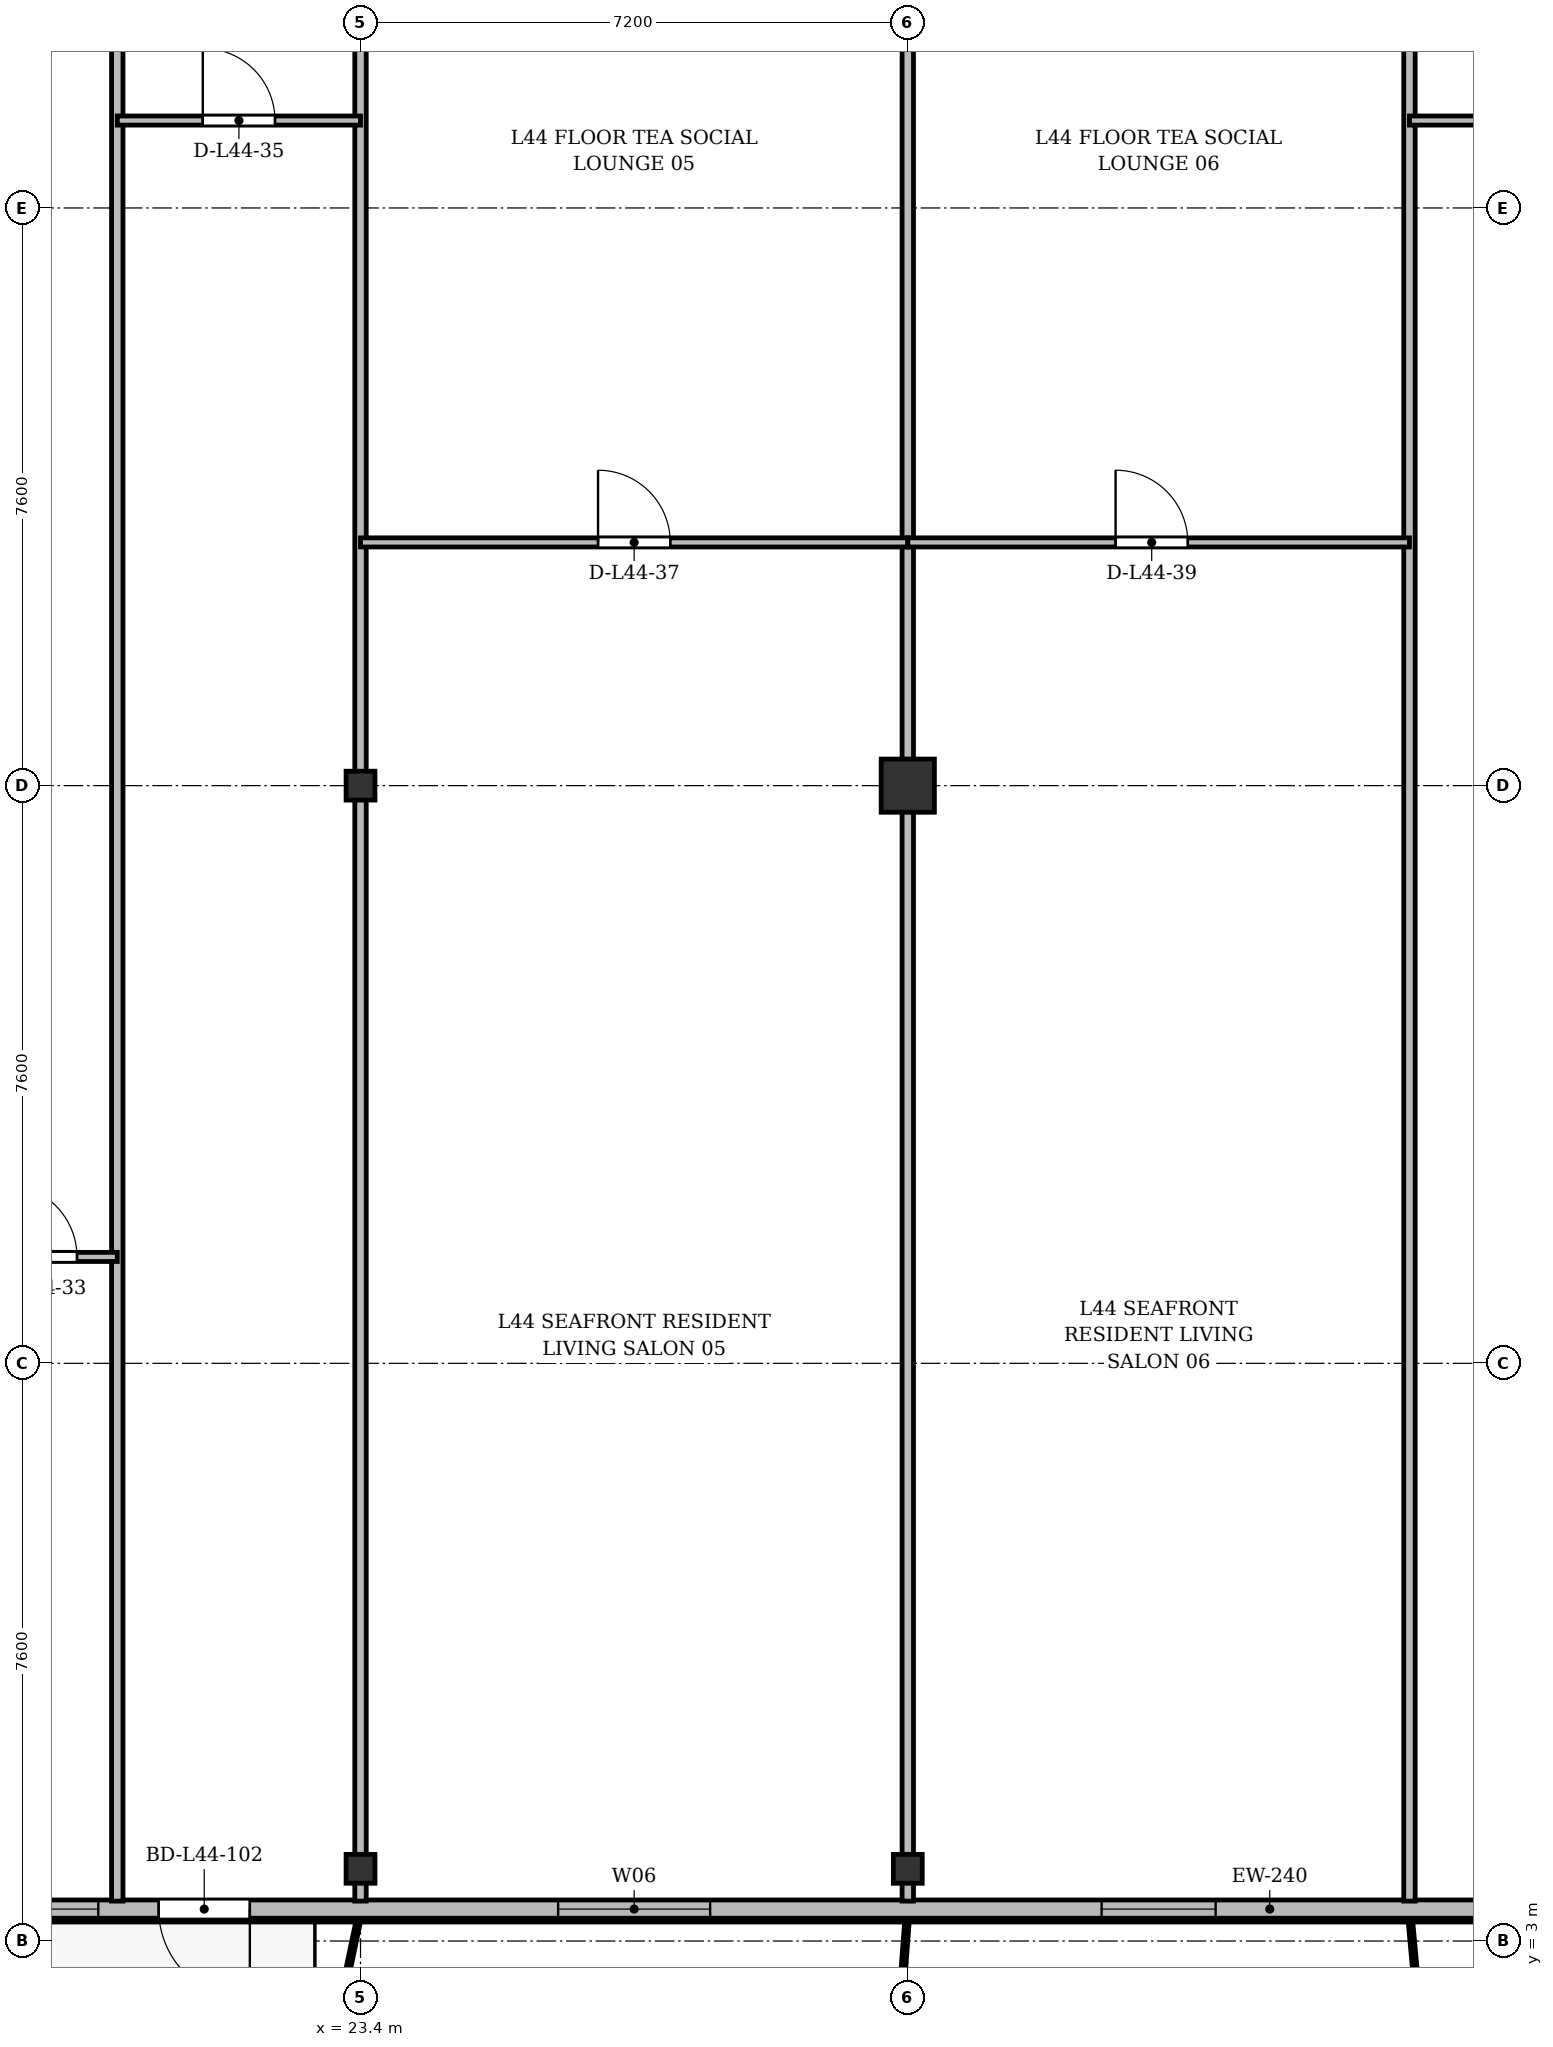
"""IFC4 building model, lengths in metres.
Left out: names, types, materials, properties, quantities, classifications, styles, units other than length and angle.
Written with IfcOpenShell. Run it as: python <this file> out.ifc"""

import sys

from ifc_helpers import new_model, si_unit, direction, frame, frame_2d, origin, origin_2d, place, context, subcontext, project, spatial, rectangle, i_section, extrude, source, transform, mapped, element, fill, save


model = new_model("IFC4")
c1 = context("Model", 3, precision=1e-05, world=origin(), true_north=direction((0.0, 1.0)))
c2 = subcontext(c1, "Body", "Model", "MODEL_VIEW")
j1 = project(units=[si_unit("LENGTHUNIT", "METRE"), si_unit("PLANEANGLEUNIT", "RADIAN")], contexts=[c1])
p1 = place(None, origin())
s1 = spatial("IfcSite", under=j1, at=p1, CompositionType="ELEMENT")
p2 = place(p1, origin())
s2 = spatial("IfcBuilding", under=s1, at=p2, CompositionType="ELEMENT")
p3 = place(p2, frame((0.0, 0.0, 168.1)))
s3 = spatial("IfcBuildingStorey", under=s2, at=p3, CompositionType="ELEMENT", Elevation=168.1)
m1 = source(origin(), c2, "Body", "SweptSolid", [
    extrude(i_section(OverallWidth=0.38, OverallDepth=0.38, WebThickness=0.02, FlangeThickness=0.03, at=origin_2d()), origin(), (0.0, 0.0, 1.0), 3.6),
])
for number, where, z_axis, x_axis in (
    (1, (23.4, 3.95, 0.0), (0.0, 0.0, 1.0), (1.0, 0.0, 0.0)),
    (2, (23.4, 18.2, 0.0), (0.0, 0.0, 1.0), (1.0, 0.0, 0.0)),
    (3, (30.6, 3.95, 0.0), (0.0, 0.0, 1.0), (1.0, 0.0, 0.0)),
):
    element("IfcColumn", number, at=place(p3, frame(where, z_axis=z_axis, x_axis=x_axis)), inside=s3, PredefinedType="COLUMN", context=c2, shape_type="MappedRepresentation", body=[
        mapped(m1, transform((0.0, 0.0, 0.0), x_axis=(1.0, 0.0, 0.0), y_axis=(0.0, 1.0, 0.0), z_axis=(0.0, 0.0, 1.0), scale=1.0)),
    ])
m2 = source(origin(), c2, "Body", "SweptSolid", [
    extrude(rectangle(XDim=0.7, YDim=0.7, at=origin_2d()), origin(), (0.0, 0.0, 1.0), 3.6),
])
p4 = place(p3, frame((30.6, 18.2, 0.0), z_axis=(0.0, 0.0, 1.0), x_axis=(1.0, 0.0, 0.0)))
e4 = element("IfcColumn", 4, at=p4, inside=s3, PredefinedType="COLUMN", context=c2, shape_type="MappedRepresentation", body=[
    mapped(m2, transform((0.0, 0.0, 0.0), x_axis=(1.0, 0.0, 0.0), y_axis=(0.0, 1.0, 0.0), z_axis=(0.0, 0.0, 1.0), scale=1.0)),
])
p5 = place(p3, frame((63.6, 3.42, 0.0), z_axis=(0.0, 0.0, 1.0), x_axis=(-1.0, 0.0, 0.0)))
e5 = element("IfcWall", 5, at=p5, inside=s3, PredefinedType="SOLIDWALL", context=c2, shape_type="SweptSolid", body=[
    extrude(rectangle(XDim=52.8, YDim=0.24, at=frame_2d((26.4, 0.0))), origin(), (0.0, 0.0, 1.0), 3.35),
])
p6 = place(p5, frame((1.62, 0.0, 0.9)))
e6 = element("IfcOpeningElement", 6, at=p6, cuts=e5, PredefinedType="OPENING", context=c2, shape_type="SweptSolid", body=[
    extrude(rectangle(XDim=1.65, YDim=1.85, at=frame_2d((0.825, 0.925))), frame((0.0, 0.13, 0.0), z_axis=(0.0, -1.0, 0.0), x_axis=(1.0, 0.0, 0.0)), (0.0, 0.0, 1.0), 0.26),
])
p7 = place(p5, frame((5.2, 0.0, 0.9)))
e7 = element("IfcOpeningElement", 7, at=p7, cuts=e5, PredefinedType="OPENING", context=c2, shape_type="SweptSolid", body=[
    extrude(rectangle(XDim=1.8, YDim=1.8, at=frame_2d((0.9, 0.9))), frame((0.0, 0.13, 0.0), z_axis=(0.0, -1.0, 0.0), x_axis=(1.0, 0.0, 0.0)), (0.0, 0.0, 1.0), 0.26),
])
p8 = place(p5, frame((7.65, 0.0, 0.9)))
e8 = element("IfcOpeningElement", 8, at=p8, cuts=e5, PredefinedType="OPENING", context=c2, shape_type="SweptSolid", body=[
    extrude(rectangle(XDim=1.5, YDim=1.75, at=frame_2d((0.75, 0.875))), frame((0.0, 0.13, 0.0), z_axis=(0.0, -1.0, 0.0), x_axis=(1.0, 0.0, 0.0)), (0.0, 0.0, 1.0), 0.26),
])
p9 = place(p5, frame((10.25, 0.0, 0.9)))
e9 = element("IfcOpeningElement", 9, at=p9, cuts=e5, PredefinedType="OPENING", context=c2, shape_type="SweptSolid", body=[
    extrude(rectangle(XDim=1.5, YDim=1.75, at=frame_2d((0.75, 0.875))), frame((0.0, 0.13, 0.0), z_axis=(0.0, -1.0, 0.0), x_axis=(1.0, 0.0, 0.0)), (0.0, 0.0, 1.0), 0.26),
])
p10 = place(p5, frame((13.62, 0.0, 0.0)))
e10 = element("IfcOpeningElement", 10, at=p10, cuts=e5, PredefinedType="OPENING", context=c2, shape_type="SweptSolid", body=[
    extrude(rectangle(XDim=1.2, YDim=2.2, at=frame_2d((0.6, 1.1))), frame((0.0, 0.13, 0.0), z_axis=(0.0, -1.0, 0.0), x_axis=(1.0, 0.0, 0.0)), (0.0, 0.0, 1.0), 0.26),
])
p11 = place(p5, frame((15.375, 0.0, 0.9)))
e11 = element("IfcOpeningElement", 11, at=p11, cuts=e5, PredefinedType="OPENING", context=c2, shape_type="SweptSolid", body=[
    extrude(rectangle(XDim=1.65, YDim=1.85, at=frame_2d((0.825, 0.925))), frame((0.0, 0.13, 0.0), z_axis=(0.0, -1.0, 0.0), x_axis=(1.0, 0.0, 0.0)), (0.0, 0.0, 1.0), 0.26),
])
p12 = place(p5, frame((17.7, 0.0, 0.9)))
e12 = element("IfcOpeningElement", 12, at=p12, cuts=e5, PredefinedType="OPENING", context=c2, shape_type="SweptSolid", body=[
    extrude(rectangle(XDim=1.8, YDim=1.8, at=frame_2d((0.9, 0.9))), frame((0.0, 0.13, 0.0), z_axis=(0.0, -1.0, 0.0), x_axis=(1.0, 0.0, 0.0)), (0.0, 0.0, 1.0), 0.26),
])
p13 = place(p5, frame((22.0, 0.0, 0.9)))
e13 = element("IfcOpeningElement", 13, at=p13, cuts=e5, PredefinedType="OPENING", context=c2, shape_type="SweptSolid", body=[
    extrude(rectangle(XDim=2.2, YDim=1.8, at=frame_2d((1.1, 0.9))), frame((0.0, 0.13, 0.0), z_axis=(0.0, -1.0, 0.0), x_axis=(1.0, 0.0, 0.0)), (0.0, 0.0, 1.0), 0.26),
])
p14 = place(p5, frame((28.95, 0.0, 0.9)))
e14 = element("IfcOpeningElement", 14, at=p14, cuts=e5, PredefinedType="OPENING", context=c2, shape_type="SweptSolid", body=[
    extrude(rectangle(XDim=1.5, YDim=1.75, at=frame_2d((0.75, 0.875))), frame((0.0, 0.13, 0.0), z_axis=(0.0, -1.0, 0.0), x_axis=(1.0, 0.0, 0.0)), (0.0, 0.0, 1.0), 0.26),
])
p15 = place(p5, frame((35.6, 0.0, 0.9)))
e15 = element("IfcOpeningElement", 15, at=p15, cuts=e5, PredefinedType="OPENING", context=c2, shape_type="SweptSolid", body=[
    extrude(rectangle(XDim=2.0, YDim=1.95, at=frame_2d((1.0, 0.975))), frame((0.0, 0.13, 0.0), z_axis=(0.0, -1.0, 0.0), x_axis=(1.0, 0.0, 0.0)), (0.0, 0.0, 1.0), 0.26),
])
p16 = place(p5, frame((41.656, 0.0, 0.0)))
e16 = element("IfcOpeningElement", 16, at=p16, cuts=e5, PredefinedType="OPENING", context=c2, shape_type="SweptSolid", body=[
    extrude(rectangle(XDim=1.2, YDim=2.2, at=frame_2d((0.6, 1.1))), frame((0.0, 0.13, 0.0), z_axis=(0.0, -1.0, 0.0), x_axis=(1.0, 0.0, 0.0)), (0.0, 0.0, 1.0), 0.26),
])
p17 = place(p5, frame((43.65, 0.0, 0.9)))
e17 = element("IfcOpeningElement", 17, at=p17, cuts=e5, PredefinedType="OPENING", context=c2, shape_type="SweptSolid", body=[
    extrude(rectangle(XDim=1.5, YDim=1.75, at=frame_2d((0.75, 0.875))), frame((0.0, 0.13, 0.0), z_axis=(0.0, -1.0, 0.0), x_axis=(1.0, 0.0, 0.0)), (0.0, 0.0, 1.0), 0.26),
])
p18 = place(p5, frame((45.95, 0.0, 0.9)))
e18 = element("IfcOpeningElement", 18, at=p18, cuts=e5, PredefinedType="OPENING", context=c2, shape_type="SweptSolid", body=[
    extrude(rectangle(XDim=1.5, YDim=1.75, at=frame_2d((0.75, 0.875))), frame((0.0, 0.13, 0.0), z_axis=(0.0, -1.0, 0.0), x_axis=(1.0, 0.0, 0.0)), (0.0, 0.0, 1.0), 0.26),
])
p19 = place(p5, frame((49.605, 0.0, 0.9)))
e19 = element("IfcOpeningElement", 19, at=p19, cuts=e5, PredefinedType="OPENING", context=c2, shape_type="SweptSolid", body=[
    extrude(rectangle(XDim=1.5, YDim=1.75, at=frame_2d((0.75, 0.875))), frame((0.0, 0.13, 0.0), z_axis=(0.0, -1.0, 0.0), x_axis=(1.0, 0.0, 0.0)), (0.0, 0.0, 1.0), 0.26),
])
for number, where, z_axis, x_axis in (
    (20, (23.4, 3.525, 0.0), (0.0, 0.0, 1.0), (0.0, 1.0, 0.0)),
    (21, (30.6, 3.525, 0.0), (0.0, 0.0, 1.0), (0.0, 1.0, 0.0)),
):
    element("IfcWall", number, at=place(p3, frame(where, z_axis=z_axis, x_axis=x_axis)), inside=s3, PredefinedType="PARTITIONING", context=c2, shape_type="SweptSolid", body=[
        extrude(rectangle(XDim=27.275, YDim=0.15, at=frame_2d((13.638, 0.0))), origin(), (0.0, 0.0, 1.0), 2.85),
    ])
for number, where, z_axis, x_axis in (
    (22, (37.2, 3.525, 0.0), (0.0, 0.0, 1.0), (0.0, 1.0, 0.0)),
    (23, (20.2, 3.525, 0.0), (0.0, 0.0, 1.0), (0.0, 1.0, 0.0)),
):
    element("IfcWall", number, at=place(p3, frame(where, z_axis=z_axis, x_axis=x_axis)), inside=s3, PredefinedType="PARTITIONING", context=c2, shape_type="SweptSolid", body=[
        extrude(rectangle(XDim=27.275, YDim=0.15, at=frame_2d((13.638, 0.0))), origin(), (0.0, 0.0, 1.0), 2.75),
    ])
p20 = place(p3, frame((18.2, 12.0, 0.0), z_axis=(0.0, 0.0, 1.0), x_axis=(1.0, 0.0, 0.0)))
e24 = element("IfcWall", 24, at=p20, inside=s3, PredefinedType="PARTITIONING", context=c2, shape_type="SweptSolid", body=[
    extrude(rectangle(XDim=2.0, YDim=0.12, at=frame_2d((1.0, 0.0))), origin(), (0.0, 0.0, 1.0), 3.35),
])
p21 = place(p20, frame((0.52, 0.0, 0.0)))
e25 = element("IfcOpeningElement", 25, at=p21, cuts=e24, PredefinedType="OPENING", context=c2, shape_type="SweptSolid", body=[
    extrude(rectangle(XDim=0.95, YDim=2.15, at=frame_2d((0.475, 1.075))), frame((0.0, 0.07, 0.0), z_axis=(0.0, -1.0, 0.0), x_axis=(1.0, 0.0, 0.0)), (0.0, 0.0, 1.0), 0.14),
])
p22 = place(p3, frame((20.2, 26.95, 0.0), z_axis=(0.0, 0.0, 1.0), x_axis=(1.0, 0.0, 0.0)))
e26 = element("IfcWall", 26, at=p22, inside=s3, PredefinedType="PARTITIONING", context=c2, shape_type="SweptSolid", body=[
    extrude(rectangle(XDim=3.2, YDim=0.12, at=frame_2d((1.6, 0.0))), origin(), (0.0, 0.0, 1.0), 2.85),
])
p23 = place(p22, frame((1.125, 0.0, 0.0)))
e27 = element("IfcOpeningElement", 27, at=p23, cuts=e26, PredefinedType="OPENING", context=c2, shape_type="SweptSolid", body=[
    extrude(rectangle(XDim=0.95, YDim=2.15, at=frame_2d((0.475, 1.075))), frame((0.0, 0.07, 0.0), z_axis=(0.0, -1.0, 0.0), x_axis=(1.0, 0.0, 0.0)), (0.0, 0.0, 1.0), 0.14),
])
p24 = place(p3, frame((23.4, 21.4, 0.0), z_axis=(0.0, 0.0, 1.0), x_axis=(1.0, 0.0, 0.0)))
e28 = element("IfcWall", 28, at=p24, inside=s3, PredefinedType="PARTITIONING", context=c2, shape_type="SweptSolid", body=[
    extrude(rectangle(XDim=7.2, YDim=0.12, at=frame_2d((3.6, 0.0))), origin(), (0.0, 0.0, 1.0), 2.85),
])
p25 = place(p24, frame((3.125, 0.0, 0.0)))
e29 = element("IfcOpeningElement", 29, at=p25, cuts=e28, PredefinedType="OPENING", context=c2, shape_type="SweptSolid", body=[
    extrude(rectangle(XDim=0.95, YDim=2.15, at=frame_2d((0.475, 1.075))), frame((0.0, 0.07, 0.0), z_axis=(0.0, -1.0, 0.0), x_axis=(1.0, 0.0, 0.0)), (0.0, 0.0, 1.0), 0.14),
])
p26 = place(p3, frame((30.6, 21.4, 0.0), z_axis=(0.0, 0.0, 1.0), x_axis=(1.0, 0.0, 0.0)))
e30 = element("IfcWall", 30, at=p26, inside=s3, PredefinedType="PARTITIONING", context=c2, shape_type="SweptSolid", body=[
    extrude(rectangle(XDim=6.6, YDim=0.12, at=frame_2d((3.3, 0.0))), origin(), (0.0, 0.0, 1.0), 2.85),
])
p27 = place(p26, frame((2.734, 0.0, 0.0)))
e31 = element("IfcOpeningElement", 31, at=p27, cuts=e30, PredefinedType="OPENING", context=c2, shape_type="SweptSolid", body=[
    extrude(rectangle(XDim=0.95, YDim=2.15, at=frame_2d((0.475, 1.075))), frame((0.0, 0.07, 0.0), z_axis=(0.0, -1.0, 0.0), x_axis=(1.0, 0.0, 0.0)), (0.0, 0.0, 1.0), 0.14),
])
p28 = place(p3, frame((37.2, 26.95, 0.0), z_axis=(0.0, 0.0, 1.0), x_axis=(1.0, 0.0, 0.0)))
e32 = element("IfcWall", 32, at=p28, inside=s3, PredefinedType="PARTITIONING", context=c2, shape_type="SweptSolid", body=[
    extrude(rectangle(XDim=6.6, YDim=0.12, at=frame_2d((3.3, 0.0))), origin(), (0.0, 0.0, 1.0), 2.85),
])
p29 = place(p28, frame((2.734, 0.0, 0.0)))
e33 = element("IfcOpeningElement", 33, at=p29, cuts=e32, PredefinedType="OPENING", context=c2, shape_type="SweptSolid", body=[
    extrude(rectangle(XDim=0.95, YDim=2.15, at=frame_2d((0.475, 1.075))), frame((0.0, 0.07, 0.0), z_axis=(0.0, -1.0, 0.0), x_axis=(1.0, 0.0, 0.0)), (0.0, 0.0, 1.0), 0.14),
])
m3 = source(origin(), c2, "Body", "SweptSolid", [
    extrude(rectangle(XDim=1.5, YDim=1.75, at=frame_2d((0.75, 0.875))), frame((0.0, 0.03, 0.0), z_axis=(0.0, -1.0, 0.0), x_axis=(1.0, 0.0, 0.0)), (0.0, 0.0, 1.0), 0.06),
])
p30 = place(p14, origin())
e34 = element("IfcWindow", 34, at=p30, inside=s3, PartitioningType="SINGLE_PANEL", PredefinedType="WINDOW", context=c2, shape_type="MappedRepresentation", body=[
    mapped(m3, transform((0.0, 0.0, 0.0), x_axis=(1.0, 0.0, 0.0), y_axis=(0.0, 1.0, 0.0), z_axis=(0.0, 0.0, 1.0), scale=1.0)),
])
fill(e14, e34)
m4 = source(origin(), c2, "Body", "SweptSolid", [
    extrude(rectangle(XDim=2.0, YDim=1.95, at=frame_2d((1.0, 0.975))), frame((0.0, 0.03, 0.0), z_axis=(0.0, -1.0, 0.0), x_axis=(1.0, 0.0, 0.0)), (0.0, 0.0, 1.0), 0.06),
])
p31 = place(p15, origin())
e35 = element("IfcWindow", 35, at=p31, inside=s3, PartitioningType="SINGLE_PANEL", PredefinedType="WINDOW", context=c2, shape_type="MappedRepresentation", body=[
    mapped(m4, transform((0.0, 0.0, 0.0), x_axis=(1.0, 0.0, 0.0), y_axis=(0.0, 1.0, 0.0), z_axis=(0.0, 0.0, 1.0), scale=1.0)),
])
fill(e15, e35)
m5 = source(origin(), c2, "Body", "SweptSolid", [
    extrude(rectangle(XDim=1.2, YDim=2.2, at=frame_2d((0.6, 1.1))), frame((0.0, 0.025, 0.0), z_axis=(0.0, -1.0, 0.0), x_axis=(1.0, 0.0, 0.0)), (0.0, 0.0, 1.0), 0.05),
])
p32 = place(p16, origin())
e36 = element("IfcDoor", 36, at=p32, inside=s3, OperationType="SINGLE_SWING_LEFT", PredefinedType="DOOR", context=c2, shape_type="MappedRepresentation", body=[
    mapped(m5, transform((0.0, 0.0, 0.0), x_axis=(1.0, 0.0, 0.0), y_axis=(0.0, 1.0, 0.0), z_axis=(0.0, 0.0, 1.0), scale=1.0)),
])
fill(e16, e36)
p33 = place(p17, origin())
e37 = element("IfcWindow", 37, at=p33, inside=s3, PartitioningType="SINGLE_PANEL", PredefinedType="WINDOW", context=c2, shape_type="MappedRepresentation", body=[
    mapped(m3, transform((0.0, 0.0, 0.0), x_axis=(1.0, 0.0, 0.0), y_axis=(0.0, 1.0, 0.0), z_axis=(0.0, 0.0, 1.0), scale=1.0)),
])
fill(e17, e37)
m6 = source(origin(), c2, "Body", "SweptSolid", [
    extrude(rectangle(XDim=0.95, YDim=2.15, at=frame_2d((0.475, 1.075))), frame((0.0, 0.025, 0.0), z_axis=(0.0, -1.0, 0.0), x_axis=(1.0, 0.0, 0.0)), (0.0, 0.0, 1.0), 0.05),
])
p34 = place(p21, origin())
e38 = element("IfcDoor", 38, at=p34, inside=s3, OperationType="SINGLE_SWING_LEFT", PredefinedType="DOOR", context=c2, shape_type="MappedRepresentation", body=[
    mapped(m6, transform((0.0, 0.0, 0.0), x_axis=(1.0, 0.0, 0.0), y_axis=(0.0, 1.0, 0.0), z_axis=(0.0, 0.0, 1.0), scale=1.0)),
])
fill(e25, e38)
p35 = place(p23, origin())
e39 = element("IfcDoor", 39, at=p35, inside=s3, OperationType="SINGLE_SWING_LEFT", PredefinedType="DOOR", context=c2, shape_type="MappedRepresentation", body=[
    mapped(m6, transform((0.0, 0.0, 0.0), x_axis=(1.0, 0.0, 0.0), y_axis=(0.0, 1.0, 0.0), z_axis=(0.0, 0.0, 1.0), scale=1.0)),
])
fill(e27, e39)
p36 = place(p25, origin())
e40 = element("IfcDoor", 40, at=p36, inside=s3, OperationType="SINGLE_SWING_LEFT", PredefinedType="DOOR", context=c2, shape_type="MappedRepresentation", body=[
    mapped(m6, transform((0.0, 0.0, 0.0), x_axis=(1.0, 0.0, 0.0), y_axis=(0.0, 1.0, 0.0), z_axis=(0.0, 0.0, 1.0), scale=1.0)),
])
fill(e29, e40)
p37 = place(p27, origin())
e41 = element("IfcDoor", 41, at=p37, inside=s3, OperationType="SINGLE_SWING_LEFT", PredefinedType="DOOR", context=c2, shape_type="MappedRepresentation", body=[
    mapped(m6, transform((0.0, 0.0, 0.0), x_axis=(1.0, 0.0, 0.0), y_axis=(0.0, 1.0, 0.0), z_axis=(0.0, 0.0, 1.0), scale=1.0)),
])
fill(e31, e41)
save(model, sys.argv[1])
